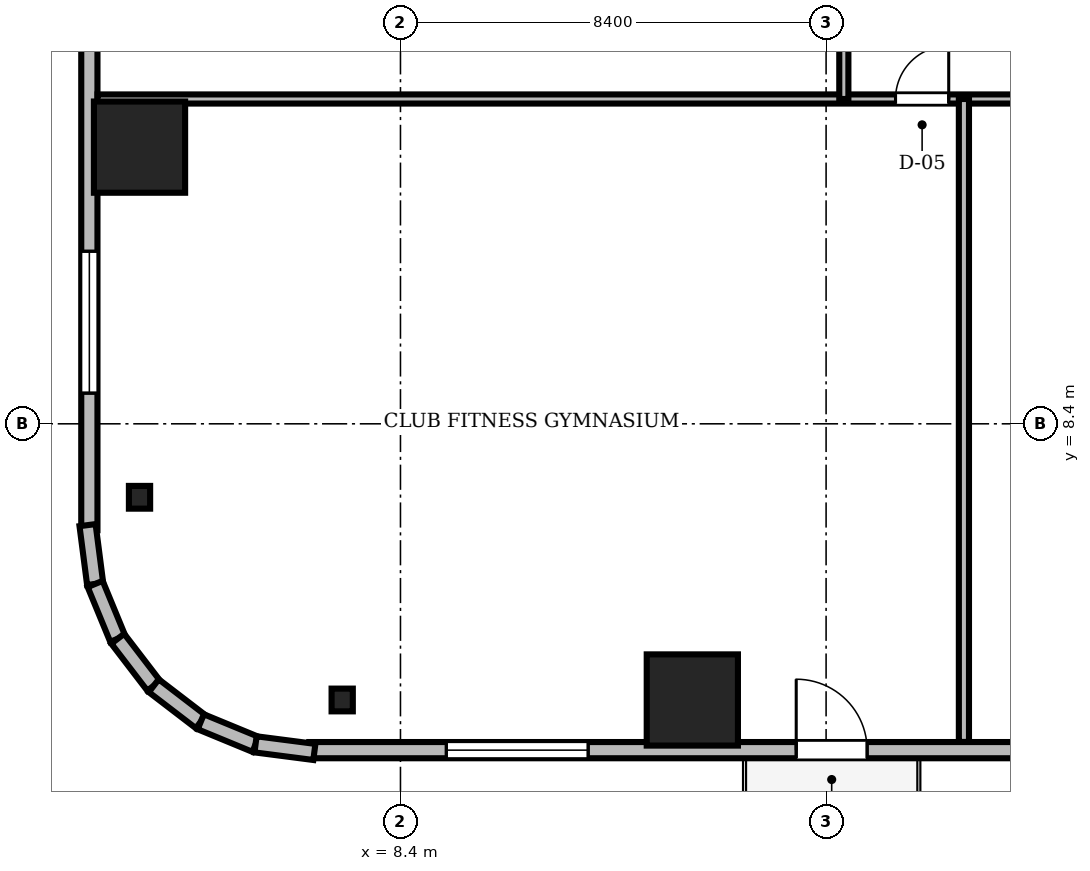
"""IFC4 building model, lengths in metres.
Left out: names, types, materials, properties, quantities, classifications, styles, units other than length and angle.
Written with IfcOpenShell. Run it as: python <this file> out.ifc"""

import sys

from ifc_helpers import new_model, si_unit, direction, frame, frame_2d, origin, origin_2d, place, context, subcontext, project, spatial, rectangle, i_section, extrude, source, transform, mapped, element, fill, save


model = new_model("IFC4")
c1 = context("Model", 3, precision=1e-05, world=origin(), true_north=direction((0.0, 1.0)))
c2 = subcontext(c1, "Body", "Model", "MODEL_VIEW")
j1 = project(units=[si_unit("LENGTHUNIT", "METRE"), si_unit("PLANEANGLEUNIT", "RADIAN")], contexts=[c1])
p1 = place(None, origin())
s1 = spatial("IfcSite", under=j1, at=p1, CompositionType="ELEMENT")
p2 = place(p1, origin())
s2 = spatial("IfcBuilding", under=s1, at=p2, CompositionType="ELEMENT")
p3 = place(p2, frame((0.0, 0.0, 86.0)))
s3 = spatial("IfcBuildingStorey", under=s2, at=p3, CompositionType="ELEMENT", Elevation=86.0)
m1 = source(origin(), c2, "Body", "SweptSolid", [
    extrude(rectangle(XDim=1.8, YDim=1.8, at=origin_2d()), origin(), (0.0, 0.0, 1.0), 3.41),
])
for number, where, z_axis, x_axis in (
    (1, (14.16, 2.95, 0.0), (0.0, 0.0, 1.0), (1.0, 0.0, 0.0)),
    (2, (3.25, 13.86, 0.0), (0.0, 0.0, 1.0), (1.0, 0.0, 0.0)),
):
    element("IfcColumn", number, at=place(p3, frame(where, z_axis=z_axis, x_axis=x_axis)), inside=s3, PredefinedType="COLUMN", context=c2, shape_type="MappedRepresentation", body=[
        mapped(m1, transform((0.0, 0.0, 0.0), scale=1.0)),
    ])
m2 = source(origin(), c2, "Body", "SweptSolid", [
    extrude(i_section(OverallWidth=0.419, OverallDepth=0.449, WebThickness=0.031, FlangeThickness=0.048, FilletRadius=0.015, at=origin_2d()), origin(), (0.0, 0.0, 1.0), 3.41),
])
for number, where, z_axis, x_axis in (
    (3, (7.25, 2.95, 0.0), (0.0, 0.0, 1.0), (1.0, 0.0, 0.0)),
    (4, (3.25, 6.95, 0.0), (0.0, 0.0, 1.0), (1.0, 0.0, 0.0)),
):
    element("IfcColumn", number, at=place(p3, frame(where, z_axis=z_axis, x_axis=x_axis)), inside=s3, PredefinedType="COLUMN", context=c2, shape_type="MappedRepresentation", body=[
        mapped(m2, transform((0.0, 0.0, 0.0), scale=1.0)),
    ])
m3 = source(origin(), c2, "Body", "SweptSolid", [
    extrude(rectangle(XDim=15.6, YDim=0.32, at=frame_2d((7.8, 0.0))), origin(), (0.0, 0.0, 1.0), 3.41),
])
p4 = place(p3, frame((6.6, 1.96, 0.0), z_axis=(0.0, 0.0, 1.0), x_axis=(1.0, 0.0, 0.0)))
e5 = element("IfcWall", 5, at=p4, inside=s3, PredefinedType="SOLIDWALL", context=c2, shape_type="MappedRepresentation", body=[
    mapped(m3, transform((0.0, 0.0, 0.0), scale=1.0)),
])
m4 = source(origin(), c2, "Body", "SweptSolid", [
    extrude(rectangle(XDim=1.4, YDim=2.3, at=frame_2d((0.7, 1.15))), frame((0.0, 0.17, 0.0), z_axis=(0.0, -1.0, 0.0), x_axis=(1.0, 0.0, 0.0)), (0.0, 0.0, 1.0), 0.34),
])
p5 = place(p4, frame((9.61, 0.0, 0.0)))
e6 = element("IfcOpeningElement", 6, at=p5, cuts=e5, PredefinedType="OPENING", context=c2, shape_type="MappedRepresentation", body=[
    mapped(m4, transform((0.0, 0.0, 0.0), scale=1.0)),
])
m5 = source(origin(), c2, "Body", "SweptSolid", [
    extrude(rectangle(XDim=2.8, YDim=2.4, at=frame_2d((1.4, 1.2))), frame((0.0, 0.17, 0.0), z_axis=(0.0, -1.0, 0.0), x_axis=(1.0, 0.0, 0.0)), (0.0, 0.0, 1.0), 0.34),
])
p6 = place(p4, frame((2.705, 0.0, 0.72)))
e7 = element("IfcOpeningElement", 7, at=p6, cuts=e5, PredefinedType="OPENING", context=c2, shape_type="MappedRepresentation", body=[
    mapped(m5, transform((0.0, 0.0, 0.0), scale=1.0)),
])
p7 = place(p3, frame((2.26, 21.9, 0.0), z_axis=(0.0, 0.0, 1.0), x_axis=(0.0, -1.0, 0.0)))
e8 = element("IfcWall", 8, at=p7, inside=s3, PredefinedType="SOLIDWALL", context=c2, shape_type="MappedRepresentation", body=[
    mapped(m3, transform((0.0, 0.0, 0.0), scale=1.0)),
])
p8 = place(p7, frame((10.095, 0.0, 0.72)))
e9 = element("IfcOpeningElement", 9, at=p8, cuts=e8, PredefinedType="OPENING", context=c2, shape_type="MappedRepresentation", body=[
    mapped(m5, transform((0.0, 0.0, 0.0), scale=1.0)),
])
m6 = source(origin(), c2, "Body", "SweptSolid", [
    extrude(rectangle(XDim=1.171, YDim=0.32, at=frame_2d((0.585, 0.0))), origin(), (0.0, 0.0, 1.0), 3.41),
])
p9 = place(p3, frame((2.224, 6.401, 0.0), z_axis=(0.0, 0.0, 1.0), x_axis=(0.128269133229, -0.991739395941, 0.0)))
e10 = element("IfcWall", 10, at=p9, inside=s3, PredefinedType="SOLIDWALL", context=c2, shape_type="MappedRepresentation", body=[
    mapped(m6, transform((0.0, 0.0, 0.0), scale=1.0)),
])
m7 = source(origin(), c2, "Body", "SweptSolid", [
    extrude(rectangle(XDim=1.169, YDim=0.32, at=frame_2d((0.584, 0.0))), origin(), (0.0, 0.0, 1.0), 3.41),
])
for number, where, z_axis, x_axis in (
    (11, (2.375, 5.24, 0.0), (0.0, 0.0, 1.0), (0.381, -0.925, 0.0)),
    (12, (2.82, 4.159, 0.0), (0.0, 0.0, 1.0), (0.608, -0.794, 0.0)),
):
    element("IfcWall", number, at=place(p3, frame(where, z_axis=z_axis, x_axis=x_axis)), inside=s3, PredefinedType="SOLIDWALL", context=c2, shape_type="MappedRepresentation", body=[
        mapped(m7, transform((0.0, 0.0, 0.0), scale=1.0)),
    ])
m8 = source(origin(), c2, "Body", "SweptSolid", [
    extrude(rectangle(XDim=1.169, YDim=0.32, at=frame_2d((0.584, 0.0))), origin(), (0.0, 0.0, 1.0), 3.41),
])
p10 = place(p3, frame((3.531, 3.231, 0.0), z_axis=(0.0, 0.0, 1.0), x_axis=(0.793663520347, -0.608356981114, 0.0)))
e13 = element("IfcWall", 13, at=p10, inside=s3, PredefinedType="SOLIDWALL", context=c2, shape_type="MappedRepresentation", body=[
    mapped(m8, transform((0.0, 0.0, 0.0), scale=1.0)),
])
m9 = source(origin(), c2, "Body", "SweptSolid", [
    extrude(rectangle(XDim=1.169, YDim=0.32, at=frame_2d((0.585, 0.0))), origin(), (0.0, 0.0, 1.0), 3.41),
])
p11 = place(p3, frame((4.459, 2.52, 0.0), z_axis=(0.0, 0.0, 1.0), x_axis=(0.924479075121, -0.381232789334, 0.0)))
e14 = element("IfcWall", 14, at=p11, inside=s3, PredefinedType="SOLIDWALL", context=c2, shape_type="MappedRepresentation", body=[
    mapped(m9, transform((0.0, 0.0, 0.0), scale=1.0)),
])
m10 = source(origin(), c2, "Body", "SweptSolid", [
    extrude(rectangle(XDim=1.17, YDim=0.32, at=frame_2d((0.585, 0.0))), origin(), (0.0, 0.0, 1.0), 3.41),
])
p12 = place(p3, frame((5.54, 2.074, 0.0), z_axis=(0.0, 0.0, 1.0), x_axis=(0.991762485493, -0.128090485085, 0.0)))
e15 = element("IfcWall", 15, at=p12, inside=s3, PredefinedType="SOLIDWALL", context=c2, shape_type="MappedRepresentation", body=[
    mapped(m10, transform((0.0, 0.0, 0.0), scale=1.0)),
])
m11 = source(origin(), c2, "Body", "SweptSolid", [
    extrude(rectangle(XDim=46.156, YDim=0.18, at=frame_2d((23.078, 0.0))), origin(), (0.0, 0.0, 1.0), 2.652),
])
p13 = place(p3, frame((2.422, 14.81, 0.0), z_axis=(0.0, 0.0, 1.0), x_axis=(1.0, 0.0, 0.0)))
e16 = element("IfcWall", 16, at=p13, inside=s3, PredefinedType="PARTITIONING", context=c2, shape_type="MappedRepresentation", body=[
    mapped(m11, transform((0.0, 0.0, 0.0), scale=1.0)),
])
m12 = source(origin(), c2, "Body", "SweptSolid", [
    extrude(rectangle(XDim=1.05, YDim=2.2, at=frame_2d((0.525, 1.1))), frame((0.0, 0.1, 0.0), z_axis=(0.0, -1.0, 0.0), x_axis=(1.0, 0.0, 0.0)), (0.0, 0.0, 1.0), 0.2),
])
p14 = place(p13, frame((15.748, 0.0, 0.0)))
e17 = element("IfcOpeningElement", 17, at=p14, cuts=e16, PredefinedType="OPENING", context=c2, shape_type="MappedRepresentation", body=[
    mapped(m12, transform((0.0, 0.0, 0.0), scale=1.0)),
])
p15 = place(p13, frame((18.823, 0.0, 0.0)))
e18 = element("IfcOpeningElement", 18, at=p15, cuts=e16, PredefinedType="OPENING", context=c2, shape_type="MappedRepresentation", body=[
    mapped(m12, transform((0.0, 0.0, 0.0), scale=1.0)),
])
p16 = place(p13, frame((23.311, 0.0, 0.0)))
e19 = element("IfcOpeningElement", 19, at=p16, cuts=e16, PredefinedType="OPENING", context=c2, shape_type="MappedRepresentation", body=[
    mapped(m12, transform((0.0, 0.0, 0.0), scale=1.0)),
])
p17 = place(p13, frame((27.8, 0.0, 0.0)))
e20 = element("IfcOpeningElement", 20, at=p17, cuts=e16, PredefinedType="OPENING", context=c2, shape_type="MappedRepresentation", body=[
    mapped(m12, transform((0.0, 0.0, 0.0), scale=1.0)),
])
m13 = source(origin(), c2, "Body", "SweptSolid", [
    extrude(rectangle(XDim=0.95, YDim=2.15, at=frame_2d((0.475, 1.075))), frame((0.0, 0.1, 0.0), z_axis=(0.0, -1.0, 0.0), x_axis=(1.0, 0.0, 0.0)), (0.0, 0.0, 1.0), 0.2),
])
p18 = place(p13, frame((33.514, 0.0, 0.0)))
e21 = element("IfcOpeningElement", 21, at=p18, cuts=e16, PredefinedType="OPENING", context=c2, shape_type="MappedRepresentation", body=[
    mapped(m13, transform((0.0, 0.0, 0.0), scale=1.0)),
])
p19 = place(p13, frame((36.778, 0.0, 0.0)))
e22 = element("IfcOpeningElement", 22, at=p19, cuts=e16, PredefinedType="OPENING", context=c2, shape_type="MappedRepresentation", body=[
    mapped(m12, transform((0.0, 0.0, 0.0), scale=1.0)),
])
p20 = place(p13, frame((42.315, 0.0, 0.0)))
e23 = element("IfcOpeningElement", 23, at=p20, cuts=e16, PredefinedType="OPENING", context=c2, shape_type="MappedRepresentation", body=[
    mapped(m12, transform((0.0, 0.0, 0.0), scale=1.0)),
])
m14 = source(origin(), c2, "Body", "SweptSolid", [
    extrude(rectangle(XDim=13.74, YDim=0.18, at=frame_2d((6.87, 0.0))), origin(), (0.0, 0.0, 1.0), 2.802),
])
p21 = place(p3, frame((17.15, 14.81, 0.0), z_axis=(0.0, 0.0, 1.0), x_axis=(0.0, 1.0, 0.0)))
e24 = element("IfcWall", 24, at=p21, inside=s3, PredefinedType="PARTITIONING", context=c2, shape_type="MappedRepresentation", body=[
    mapped(m14, transform((0.0, 0.0, 0.0), scale=1.0)),
])
m15 = source(origin(), c2, "Body", "SweptSolid", [
    extrude(rectangle(XDim=12.688, YDim=0.2, at=frame_2d((6.344, 0.0))), origin(), (0.0, 0.0, 1.0), 2.652),
])
p22 = place(p3, frame((19.52, 2.122, 0.0), z_axis=(0.0, 0.0, 1.0), x_axis=(0.0, 1.0, 0.0)))
e25 = element("IfcWall", 25, at=p22, inside=s3, PredefinedType="PARTITIONING", context=c2, shape_type="MappedRepresentation", body=[
    mapped(m15, transform((0.0, 0.0, 0.0), scale=1.0)),
])
m16 = source(origin(), c2, "Body", "SweptSolid", [
    extrude(rectangle(XDim=1.4, YDim=2.3, at=frame_2d((0.7, 1.15))), frame((0.0, 0.025, 0.0), z_axis=(0.0, -1.0, 0.0), x_axis=(1.0, 0.0, 0.0)), (0.0, 0.0, 1.0), 0.05),
])
p23 = place(p5, frame((1.4, 0.0, 0.0), z_axis=(0.0, 0.0, 1.0), x_axis=(-1.0, 0.0, 0.0)))
e26 = element("IfcDoor", 26, at=p23, inside=s3, OperationType="DOUBLE_DOOR_SLIDING", PredefinedType="DOOR", context=c2, shape_type="MappedRepresentation", body=[
    mapped(m16, transform((0.0, 0.0, 0.0), scale=1.0)),
])
fill(e6, e26)
m17 = source(origin(), c2, "Body", "SweptSolid", [
    extrude(rectangle(XDim=2.8, YDim=2.4, at=frame_2d((1.4, 1.2))), frame((0.0, 0.03, 0.0), z_axis=(0.0, -1.0, 0.0), x_axis=(1.0, 0.0, 0.0)), (0.0, 0.0, 1.0), 0.06),
])
p24 = place(p6, origin())
e27 = element("IfcWindow", 27, at=p24, inside=s3, PartitioningType="SINGLE_PANEL", PredefinedType="WINDOW", context=c2, shape_type="MappedRepresentation", body=[
    mapped(m17, transform((0.0, 0.0, 0.0), scale=1.0)),
])
fill(e7, e27)
p25 = place(p8, origin())
e28 = element("IfcWindow", 28, at=p25, inside=s3, PartitioningType="SINGLE_PANEL", PredefinedType="WINDOW", context=c2, shape_type="MappedRepresentation", body=[
    mapped(m17, transform((0.0, 0.0, 0.0), scale=1.0)),
])
fill(e9, e28)
m18 = source(origin(), c2, "Body", "SweptSolid", [
    extrude(rectangle(XDim=1.05, YDim=2.2, at=frame_2d((0.525, 1.1))), frame((0.0, 0.025, 0.0), z_axis=(0.0, -1.0, 0.0), x_axis=(1.0, 0.0, 0.0)), (0.0, 0.0, 1.0), 0.05),
])
p26 = place(p14, origin())
e29 = element("IfcDoor", 29, at=p26, inside=s3, OperationType="SINGLE_SWING_RIGHT", PredefinedType="DOOR", context=c2, shape_type="MappedRepresentation", body=[
    mapped(m18, transform((0.0, 0.0, 0.0), scale=1.0)),
])
fill(e17, e29)
save(model, sys.argv[1])
